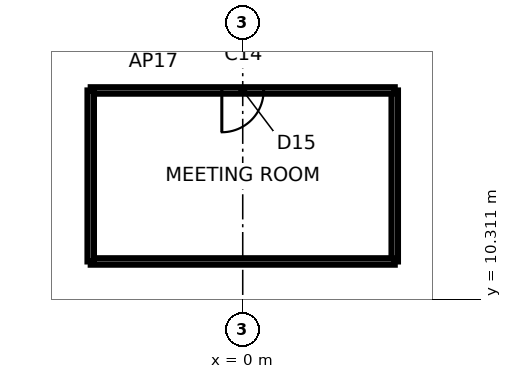
"""IFC4 building model, lengths in metres.
Left out: names, types, materials, properties, quantities, classifications, styles, units other than length and angle.
Written with IfcOpenShell. Run it as: python <this file> out.ifc"""

import sys

from ifc_helpers import new_model, si_unit, direction, frame, frame_2d, origin, place, context, subcontext, project, spatial, rectangle, extrude, element, fill, save


model = new_model("IFC4")
c1 = context("Model", 3, precision=1e-05, world=origin(), true_north=direction((0.0, 1.0)))
c2 = subcontext(c1, "Body", "Model", "MODEL_VIEW")
j1 = project(units=[si_unit("LENGTHUNIT", "METRE"), si_unit("PLANEANGLEUNIT", "RADIAN")], contexts=[c1])
p1 = place(None, origin())
s1 = spatial("IfcSite", under=j1, at=p1, CompositionType="ELEMENT")
p2 = place(p1, origin())
s2 = spatial("IfcBuilding", under=s1, at=p2, CompositionType="ELEMENT")
p3 = place(p2, frame((0.0, 0.0, 215.0)))
s3 = spatial("IfcBuildingStorey", under=s2, at=p3, CompositionType="ELEMENT", Elevation=215.0)
p4 = place(p3, frame((4.0, 15.8, 0.0), z_axis=(0.0, 0.0, 1.0), x_axis=(0.0, -1.0, 0.0)))
e1 = element("IfcWall", 1, at=p4, inside=s3, PredefinedType="PARTITIONING", context=c2, shape_type="SweptSolid", body=[
    extrude(rectangle(XDim=4.5, YDim=0.17, at=frame_2d((2.25, 0.0))), origin(), (0.0, 0.0, 1.0), 3.74),
])
p5 = place(p3, frame((-4.0, 15.8, 0.0), z_axis=(0.0, 0.0, 1.0), x_axis=(1.0, 0.0, 0.0)))
e2 = element("IfcWall", 2, at=p5, inside=s3, PredefinedType="PARTITIONING", context=c2, shape_type="SweptSolid", body=[
    extrude(rectangle(XDim=8.0, YDim=0.17, at=frame_2d((4.0, 0.0))), origin(), (0.0, 0.0, 1.0), 3.74),
])
p6 = place(p5, frame((3.45, 0.0, 0.0)))
e3 = element("IfcOpeningElement", 3, at=p6, cuts=e2, PredefinedType="OPENING", context=c2, shape_type="SweptSolid", body=[
    extrude(rectangle(XDim=1.1, YDim=2.4, at=frame_2d((0.55, 1.2))), frame((0.0, 0.095, 0.0), z_axis=(0.0, -1.0, 0.0), x_axis=(1.0, 0.0, 0.0)), (0.0, 0.0, 1.0), 0.19),
])
p7 = place(p3, frame((4.0, 11.3, 0.0), z_axis=(0.0, 0.0, 1.0), x_axis=(-1.0, 0.0, 0.0)))
e4 = element("IfcWall", 4, at=p7, inside=s3, PredefinedType="PARTITIONING", context=c2, shape_type="SweptSolid", body=[
    extrude(rectangle(XDim=8.0, YDim=0.17, at=frame_2d((4.0, 0.0))), origin(), (0.0, 0.0, 1.0), 3.74),
])
p8 = place(p3, frame((-4.0, 11.3, 0.0), z_axis=(0.0, 0.0, 1.0), x_axis=(0.0, 1.0, 0.0)))
e5 = element("IfcWall", 5, at=p8, inside=s3, PredefinedType="PARTITIONING", context=c2, shape_type="SweptSolid", body=[
    extrude(rectangle(XDim=4.5, YDim=0.17, at=frame_2d((2.25, 0.0))), origin(), (0.0, 0.0, 1.0), 3.74),
])
p9 = place(p6, frame((1.1, 0.0, 0.0), z_axis=(0.0, 0.0, 1.0), x_axis=(-1.0, 0.0, 0.0)))
e6 = element("IfcDoor", 6, at=p9, inside=s3, OperationType="SINGLE_SWING_RIGHT", PredefinedType="DOOR", context=c2, shape_type="SweptSolid", body=[
    extrude(rectangle(XDim=1.1, YDim=2.4, at=frame_2d((0.55, 1.2))), frame((0.0, 0.025, 0.0), z_axis=(0.0, -1.0, 0.0), x_axis=(1.0, 0.0, 0.0)), (0.0, 0.0, 1.0), 0.05),
])
fill(e3, e6)
save(model, sys.argv[1])
